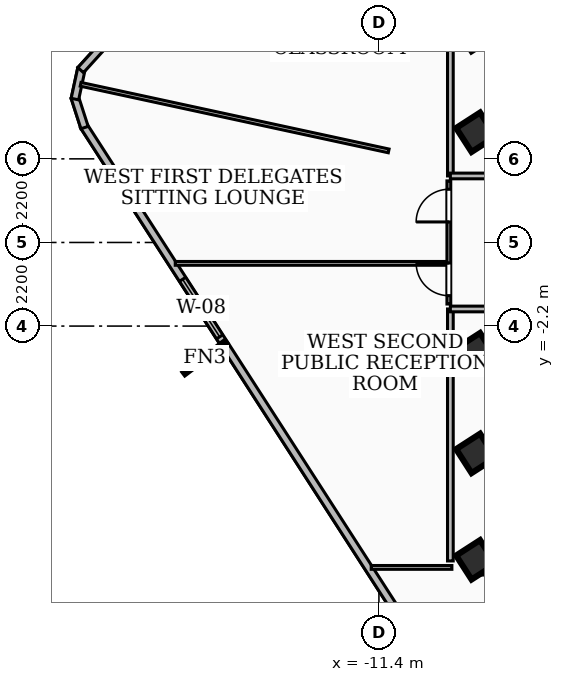
"""IFC4 building model, lengths in metres.
Left out: names, types, materials, properties, quantities, classifications, styles, units other than length and angle.
Written with IfcOpenShell. Run it as: python <this file> out.ifc"""

import sys

from ifc_helpers import new_model, si_unit, direction, frame, frame_2d, origin, origin_2d, place, context, subcontext, project, spatial, rectangle, extrude, element, fill, save


model = new_model("IFC4")
c1 = context("Model", 3, precision=1e-05, world=origin(), true_north=direction((0.0, 1.0)))
c2 = subcontext(c1, "Body", "Model", "MODEL_VIEW")
j1 = project(units=[si_unit("LENGTHUNIT", "METRE"), si_unit("PLANEANGLEUNIT", "RADIAN")], contexts=[c1])
p1 = place(None, origin())
s1 = spatial("IfcSite", under=j1, at=p1, CompositionType="ELEMENT")
p2 = place(p1, origin())
s2 = spatial("IfcBuilding", under=s1, at=p2, CompositionType="ELEMENT")
p3 = place(p2, frame((0.0, 0.0, 218.88)))
s3 = spatial("IfcBuildingStorey", under=s2, at=p3, CompositionType="ELEMENT", Elevation=218.88)
p4 = place(p3, frame((8.78, -8.51, 0.0), z_axis=(0.0, 0.0, 1.0), x_axis=(-1.0, 0.0, 0.0)))
e1 = element("IfcWall", 1, at=p4, inside=s3, PredefinedType="SHEAR", context=c2, shape_type="SweptSolid", body=[
    extrude(rectangle(XDim=17.56, YDim=0.4, at=frame_2d((8.78, 0.0))), origin(), (0.0, 0.0, 1.0), 3.14),
])
for number, where, z_axis, x_axis in (
    (2, (-8.85, -5.55, 0.0), (0.0, 0.0, 1.0), (0.841, 0.542, 0.0)),
    (3, (-8.85, -2.9, 0.0), (0.0, 0.0, 1.0), (0.841, 0.542, 0.0)),
    (4, (-8.85, 2.9, 0.0), (0.0, 0.0, 1.0), (0.841, 0.542, 0.0)),
    (5, (-8.85, -8.35, 0.0), (0.0, 0.0, 1.0), (0.841, 0.542, 0.0)),
):
    element("IfcColumn", number, at=place(p3, frame(where, z_axis=z_axis, x_axis=x_axis)), inside=s3, PredefinedType="COLUMN", context=c2, shape_type="SweptSolid", body=[
        extrude(rectangle(XDim=0.75, YDim=0.75, at=origin_2d()), origin(), (0.0, 0.0, 1.0), 3.42),
    ])
p5 = place(p3, frame((-5.124, -18.723, 0.0), z_axis=(0.0, 0.0, 1.0), x_axis=(-0.541724400477, 0.840556169407, 0.0)))
e6 = element("IfcWall", 6, at=p5, inside=s3, PredefinedType="SOLIDWALL", context=c2, shape_type="SweptSolid", body=[
    extrude(rectangle(XDim=25.925, YDim=0.2, at=frame_2d((12.962, 0.0))), origin(), (0.0, 0.0, 1.0), 3.14),
])
p6 = place(p5, frame((19.321, 0.0, 0.85)))
e7 = element("IfcOpeningElement", 7, at=p6, cuts=e6, PredefinedType="OPENING", context=c2, shape_type="SweptSolid", body=[
    extrude(rectangle(XDim=1.8, YDim=1.8, at=frame_2d((0.9, 0.9))), frame((0.0, 0.11, 0.0), z_axis=(0.0, -1.0, 0.0), x_axis=(1.0, 0.0, 0.0)), (0.0, 0.0, 1.0), 0.22),
])
p7 = place(p3, frame((-19.146, 3.023, 0.0), z_axis=(0.0, 0.0, 1.0), x_axis=(-0.306602907463, 0.951837516142, 0.0)))
e8 = element("IfcWall", 8, at=p7, inside=s3, PredefinedType="SOLIDWALL", context=c2, shape_type="SweptSolid", body=[
    extrude(rectangle(XDim=0.838, YDim=0.2, at=frame_2d((0.419, 0.0))), origin(), (0.0, 0.0, 1.0), 3.14),
])
p8 = place(p3, frame((-19.4, 3.773, 0.0), z_axis=(0.0, 0.0, 1.0), x_axis=(0.211087829535, 0.977467098281, 0.0)))
e9 = element("IfcWall", 9, at=p8, inside=s3, PredefinedType="SOLIDWALL", context=c2, shape_type="SweptSolid", body=[
    extrude(rectangle(XDim=0.823, YDim=0.2, at=frame_2d((0.412, 0.0))), origin(), (0.0, 0.0, 1.0), 3.14),
])
p9 = place(p3, frame((-19.248, 4.535, 0.0), z_axis=(0.0, 0.0, 1.0), x_axis=(0.671019988703, 0.741439258983, 0.0)))
e10 = element("IfcWall", 10, at=p9, inside=s3, PredefinedType="SOLIDWALL", context=c2, shape_type="SweptSolid", body=[
    extrude(rectangle(XDim=0.839, YDim=0.2, at=frame_2d((0.419, 0.0))), origin(), (0.0, 0.0, 1.0), 3.14),
])
p10 = place(p3, frame((-9.52, 1.75, 0.0), z_axis=(0.0, 0.0, 1.0), x_axis=(0.0, 1.0, 0.0)))
e11 = element("IfcWall", 11, at=p10, inside=s3, PredefinedType="PARTITIONING", context=c2, shape_type="SweptSolid", body=[
    extrude(rectangle(XDim=6.63, YDim=0.15, at=frame_2d((3.315, 0.0))), origin(), (0.0, 0.0, 1.0), 3.14),
])
p11 = place(p3, frame((-7.85, 1.75, 0.0), z_axis=(0.0, 0.0, 1.0), x_axis=(-1.0, 0.0, 0.0)))
e12 = element("IfcWall", 12, at=p11, inside=s3, PredefinedType="PARTITIONING", context=c2, shape_type="SweptSolid", body=[
    extrude(rectangle(XDim=1.67, YDim=0.15, at=frame_2d((0.835, 0.0))), origin(), (0.0, 0.0, 1.0), 2.37),
])
p12 = place(p3, frame((-9.52, -8.38, 0.0), z_axis=(0.0, 0.0, 1.0), x_axis=(0.0, 1.0, 0.0)))
e13 = element("IfcWall", 13, at=p12, inside=s3, PredefinedType="PARTITIONING", context=c2, shape_type="SweptSolid", body=[
    extrude(rectangle(XDim=6.63, YDim=0.15, at=frame_2d((3.315, 0.0))), origin(), (0.0, 0.0, 1.0), 3.14),
])
p13 = place(p3, frame((-7.85, -1.75, 0.0), z_axis=(0.0, 0.0, 1.0), x_axis=(-1.0, 0.0, 0.0)))
e14 = element("IfcWall", 14, at=p13, inside=s3, PredefinedType="PARTITIONING", context=c2, shape_type="SweptSolid", body=[
    extrude(rectangle(XDim=1.67, YDim=0.15, at=frame_2d((0.835, 0.0))), origin(), (0.0, 0.0, 1.0), 2.37),
])
p14 = place(p3, frame((-16.759, -0.55, 0.0), z_axis=(0.0, 0.0, 1.0), x_axis=(1.0, 0.0, 0.0)))
e15 = element("IfcWall", 15, at=p14, inside=s3, PredefinedType="PARTITIONING", context=c2, shape_type="SweptSolid", body=[
    extrude(rectangle(XDim=7.099, YDim=0.1, at=frame_2d((3.55, 0.0))), origin(), (0.0, 0.0, 1.0), 3.14),
])
p15 = place(p3, frame((-11.603, -8.55, 0.0), z_axis=(0.0, 0.0, 1.0), x_axis=(1.0, 0.0, 0.0)))
e16 = element("IfcWall", 16, at=p15, inside=s3, PredefinedType="PARTITIONING", context=c2, shape_type="SweptSolid", body=[
    extrude(rectangle(XDim=2.123, YDim=0.1, at=frame_2d((1.062, 0.0))), origin(), (0.0, 0.0, 1.0), 3.14),
])
p16 = place(p3, frame((-9.56, -1.62, 0.0), z_axis=(0.0, 0.0, 1.0), x_axis=(0.0, 1.0, 0.0)))
e17 = element("IfcWall", 17, at=p16, inside=s3, PredefinedType="PARTITIONING", context=c2, shape_type="SweptSolid", body=[
    extrude(rectangle(XDim=3.24, YDim=0.1, at=frame_2d((1.62, 0.0))), origin(), (0.0, 0.0, 1.0), 3.14),
])
p17 = place(p16, frame((0.22, 0.0, 0.0)))
e18 = element("IfcOpeningElement", 18, at=p17, cuts=e17, PredefinedType="OPENING", context=c2, shape_type="SweptSolid", body=[
    extrude(rectangle(XDim=0.86, YDim=2.04, at=frame_2d((0.43, 1.02))), frame((0.0, 0.06, 0.0), z_axis=(0.0, -1.0, 0.0), x_axis=(1.0, 0.0, 0.0)), (0.0, 0.0, 1.0), 0.12),
])
p18 = place(p16, frame((2.16, 0.0, 0.0)))
e19 = element("IfcOpeningElement", 19, at=p18, cuts=e17, PredefinedType="OPENING", context=c2, shape_type="SweptSolid", body=[
    extrude(rectangle(XDim=0.86, YDim=2.04, at=frame_2d((0.43, 1.02))), frame((0.0, 0.06, 0.0), z_axis=(0.0, -1.0, 0.0), x_axis=(1.0, 0.0, 0.0)), (0.0, 0.0, 1.0), 0.12),
])
p19 = place(p3, frame((-11.143, 2.409, 0.0), z_axis=(0.0, 0.0, 1.0), x_axis=(-0.977406112831, 0.211370032411, 0.0)))
e20 = element("IfcWall", 20, at=p19, inside=s3, PredefinedType="PARTITIONING", context=c2, shape_type="SweptSolid", body=[
    extrude(rectangle(XDim=8.294, YDim=0.1, at=frame_2d((4.147, 0.0))), origin(), (0.0, 0.0, 1.0), 3.14),
])
p20 = place(p6, origin())
e21 = element("IfcWindow", 21, at=p20, inside=s3, PartitioningType="SINGLE_PANEL", PredefinedType="WINDOW", context=c2, shape_type="SweptSolid", body=[
    extrude(rectangle(XDim=1.8, YDim=1.8, at=frame_2d((0.9, 0.9))), frame((0.0, 0.03, 0.0), z_axis=(0.0, -1.0, 0.0), x_axis=(1.0, 0.0, 0.0)), (0.0, 0.0, 1.0), 0.06),
])
fill(e7, e21)
p21 = place(p17, origin())
e22 = element("IfcDoor", 22, at=p21, inside=s3, OperationType="SINGLE_SWING_RIGHT", PredefinedType="DOOR", context=c2, shape_type="SweptSolid", body=[
    extrude(rectangle(XDim=0.86, YDim=2.04, at=frame_2d((0.43, 1.02))), frame((0.0, 0.025, 0.0), z_axis=(0.0, -1.0, 0.0), x_axis=(1.0, 0.0, 0.0)), (0.0, 0.0, 1.0), 0.05),
])
fill(e18, e22)
p22 = place(p18, origin())
e23 = element("IfcDoor", 23, at=p22, inside=s3, OperationType="SINGLE_SWING_LEFT", PredefinedType="DOOR", context=c2, shape_type="SweptSolid", body=[
    extrude(rectangle(XDim=0.86, YDim=2.04, at=frame_2d((0.43, 1.02))), frame((0.0, 0.025, 0.0), z_axis=(0.0, -1.0, 0.0), x_axis=(1.0, 0.0, 0.0)), (0.0, 0.0, 1.0), 0.05),
])
fill(e19, e23)
save(model, sys.argv[1])
